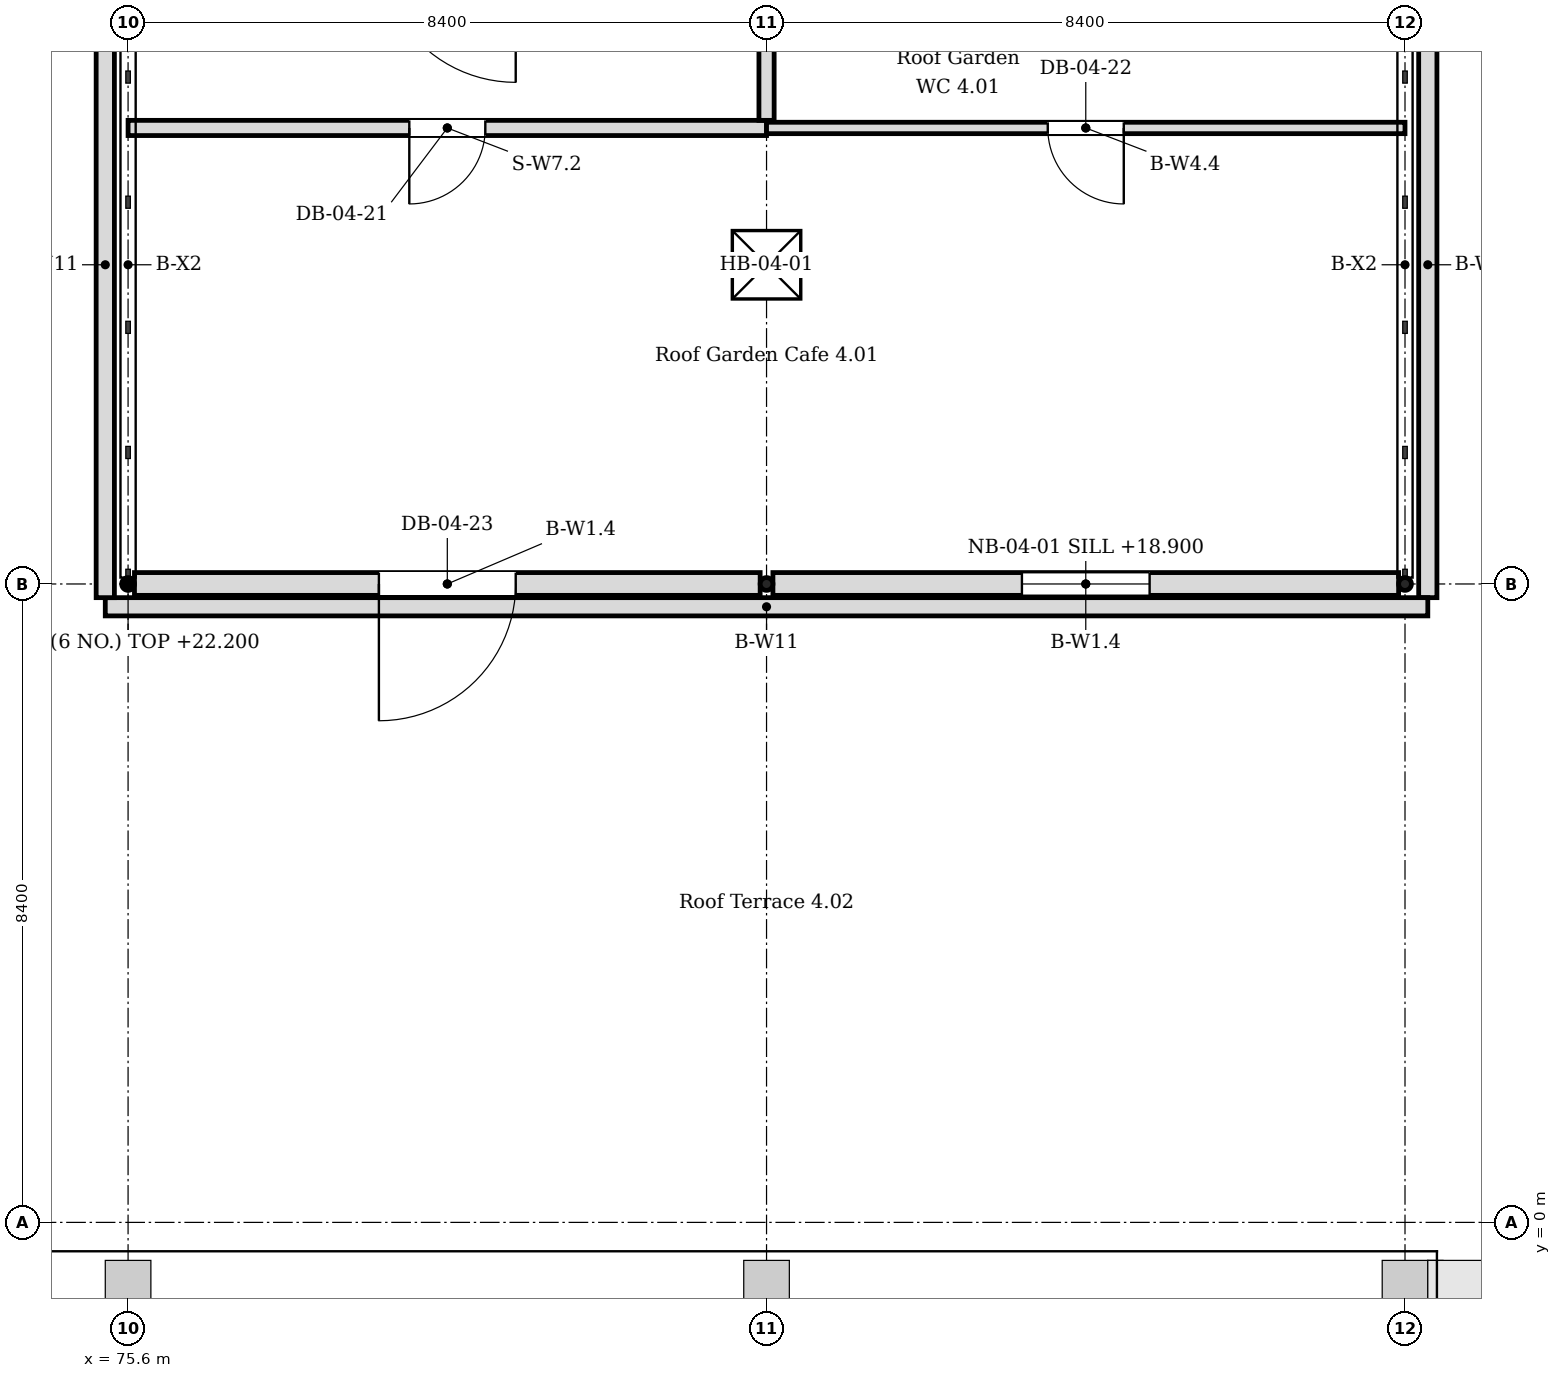
"""IFC4 building model, lengths in metres.
Left out: names, types, materials, properties, quantities, classifications, styles, units other than length and angle.
Written with IfcOpenShell. Run it as: python <this file> out.ifc"""

import sys

from ifc_helpers import new_model, si_unit, direction, frame, frame_2d, origin, origin_2d, place, context, subcontext, project, spatial, rectangle, hollow_circle, extrude, element, fill, save


model = new_model("IFC4")
c1 = context("Model", 3, precision=1e-05, world=origin(), true_north=direction((0.0, 1.0)))
c2 = subcontext(c1, "Body", "Model", "MODEL_VIEW")
j1 = project(units=[si_unit("LENGTHUNIT", "METRE"), si_unit("PLANEANGLEUNIT", "RADIAN")], contexts=[c1])
p1 = place(None, origin())
s1 = spatial("IfcSite", under=j1, at=p1, CompositionType="ELEMENT")
p2 = place(p1, origin())
s2 = spatial("IfcBuilding", under=s1, at=p2, CompositionType="ELEMENT")
p3 = place(p2, frame((0.0, 0.0, 18.6)))
s3 = spatial("IfcBuildingStorey", under=s2, at=p3, CompositionType="ELEMENT", Elevation=18.6)
for number, where, z_axis, x_axis in (
    (1, (75.6, 8.4, 0.0), (0.0, 0.0, 1.0), (1.0, 0.0, 0.0)),
    (2, (84.0, 8.4, 0.0), (0.0, 0.0, 1.0), (1.0, 0.0, 0.0)),
    (3, (92.4, 8.4, 0.0), (0.0, 0.0, 1.0), (1.0, 0.0, 0.0)),
):
    element("IfcColumn", number, at=place(p3, frame(where, z_axis=z_axis, x_axis=x_axis)), inside=s3, PredefinedType="COLUMN", context=c2, shape_type="SweptSolid", body=[
        extrude(hollow_circle(Radius=0.084, WallThickness=0.008, at=origin_2d()), origin(), (0.0, 0.0, 1.0), 3.6),
    ])
p4 = place(p3, frame((75.6, 14.4, 0.0), z_axis=(0.0, 0.0, 1.0), x_axis=(1.0, 0.0, 0.0)))
e4 = element("IfcWall", 4, at=p4, inside=s3, PredefinedType="PARTITIONING", context=c2, shape_type="SweptSolid", body=[
    extrude(rectangle(XDim=8.4, YDim=0.2, at=frame_2d((4.2, 0.0))), origin(), (0.0, 0.0, 1.0), 3.254),
])
p5 = place(p4, frame((3.7, 0.0, 0.0)))
e5 = element("IfcOpeningElement", 5, at=p5, cuts=e4, PredefinedType="OPENING", context=c2, shape_type="SweptSolid", body=[
    extrude(rectangle(XDim=1.0, YDim=2.1, at=frame_2d((0.5, 1.05))), frame((0.0, 0.11, 0.0), z_axis=(0.0, -1.0, 0.0), x_axis=(1.0, 0.0, 0.0)), (0.0, 0.0, 1.0), 0.22),
])
p6 = place(p3, frame((84.0, 14.4, 0.0), z_axis=(0.0, 0.0, 1.0), x_axis=(1.0, 0.0, 0.0)))
e6 = element("IfcWall", 6, at=p6, inside=s3, PredefinedType="PARTITIONING", context=c2, shape_type="SweptSolid", body=[
    extrude(rectangle(XDim=8.4, YDim=0.15, at=frame_2d((4.2, 0.0))), origin(), (0.0, 0.0, 1.0), 3.254),
])
p7 = place(p6, frame((3.7, 0.0, 0.0)))
e7 = element("IfcOpeningElement", 7, at=p7, cuts=e6, PredefinedType="OPENING", context=c2, shape_type="SweptSolid", body=[
    extrude(rectangle(XDim=1.0, YDim=2.1, at=frame_2d((0.5, 1.05))), frame((0.0, 0.085, 0.0), z_axis=(0.0, -1.0, 0.0), x_axis=(1.0, 0.0, 0.0)), (0.0, 0.0, 1.0), 0.17),
])
p8 = place(p3, frame((84.0, 14.5, 0.0), z_axis=(0.0, 0.0, 1.0), x_axis=(0.0, 1.0, 0.0)))
e8 = element("IfcWall", 8, at=p8, inside=s3, PredefinedType="PARTITIONING", context=c2, shape_type="SweptSolid", body=[
    extrude(rectangle(XDim=2.216, YDim=0.2, at=frame_2d((1.108, 0.0))), origin(), (0.0, 0.0, 1.0), 3.254),
])
p9 = place(p3, frame((75.684, 8.4, 0.0), z_axis=(0.0, 0.0, 1.0), x_axis=(1.0, 0.0, 0.0)))
e9 = element("IfcWall", 9, at=p9, inside=s3, PredefinedType="SOLIDWALL", context=c2, shape_type="SweptSolid", body=[
    extrude(rectangle(XDim=8.232, YDim=0.3, at=frame_2d((4.116, 0.0))), origin(), (0.0, 0.0, 1.0), 3.254),
])
p10 = place(p9, frame((3.216, 0.0, 0.0)))
e10 = element("IfcOpeningElement", 10, at=p10, cuts=e9, PredefinedType="OPENING", context=c2, shape_type="SweptSolid", body=[
    extrude(rectangle(XDim=1.8, YDim=2.2, at=frame_2d((0.9, 1.1))), frame((0.0, 0.16, 0.0), z_axis=(0.0, -1.0, 0.0), x_axis=(1.0, 0.0, 0.0)), (0.0, 0.0, 1.0), 0.32),
])
p11 = place(p3, frame((84.084, 8.4, 0.0), z_axis=(0.0, 0.0, 1.0), x_axis=(1.0, 0.0, 0.0)))
e11 = element("IfcWall", 11, at=p11, inside=s3, PredefinedType="SOLIDWALL", context=c2, shape_type="SweptSolid", body=[
    extrude(rectangle(XDim=8.232, YDim=0.3, at=frame_2d((4.116, 0.0))), origin(), (0.0, 0.0, 1.0), 3.254),
])
p12 = place(p11, frame((3.276, 0.0, 0.3)))
e12 = element("IfcOpeningElement", 12, at=p12, cuts=e11, PredefinedType="OPENING", context=c2, shape_type="SweptSolid", body=[
    extrude(rectangle(XDim=1.68, YDim=2.8, at=frame_2d((0.84, 1.4))), frame((0.0, 0.16, 0.0), z_axis=(0.0, -1.0, 0.0), x_axis=(1.0, 0.0, 0.0)), (0.0, 0.0, 1.0), 0.32),
])
p13 = place(p3, frame((75.3, 8.1, 3.8), z_axis=(0.0, 0.0, 1.0), x_axis=(1.0, 0.0, 0.0)))
e13 = element("IfcWall", 13, at=p13, inside=s3, PredefinedType="SOLIDWALL", context=c2, shape_type="SweptSolid", body=[
    extrude(rectangle(XDim=17.4, YDim=0.24, at=frame_2d((8.7, 0.0))), origin(), (0.0, 0.0, 1.0), 0.5),
])
for number, where, z_axis, x_axis in (
    (14, (75.3, 8.22, 3.8), (0.0, 0.0, 1.0), (0.0, 1.0, 0.0)),
    (15, (92.7, 8.22, 3.8), (0.0, 0.0, 1.0), (0.0, 1.0, 0.0)),
):
    element("IfcWall", number, at=place(p3, frame(where, z_axis=z_axis, x_axis=x_axis)), inside=s3, PredefinedType="SOLIDWALL", context=c2, shape_type="SweptSolid", body=[
        extrude(rectangle(XDim=8.76, YDim=0.24, at=frame_2d((4.38, 0.0))), origin(), (0.0, 0.0, 1.0), 0.5),
    ])
p14 = place(p5, origin())
e16 = element("IfcDoor", 16, at=p14, inside=s3, OperationType="SINGLE_SWING_LEFT", PredefinedType="DOOR", context=c2, shape_type="SweptSolid", body=[
    extrude(rectangle(XDim=1.0, YDim=2.1, at=frame_2d((0.5, 1.05))), frame((0.0, 0.025, 0.0), z_axis=(0.0, -1.0, 0.0), x_axis=(1.0, 0.0, 0.0)), (0.0, 0.0, 1.0), 0.05),
])
fill(e5, e16)
p15 = place(p7, origin())
e17 = element("IfcDoor", 17, at=p15, inside=s3, OperationType="SINGLE_SWING_LEFT", PredefinedType="DOOR", context=c2, shape_type="SweptSolid", body=[
    extrude(rectangle(XDim=1.0, YDim=2.1, at=frame_2d((0.5, 1.05))), frame((0.0, 0.025, 0.0), z_axis=(0.0, -1.0, 0.0), x_axis=(1.0, 0.0, 0.0)), (0.0, 0.0, 1.0), 0.05),
])
fill(e7, e17)
p16 = place(p10, origin())
e18 = element("IfcDoor", 18, at=p16, inside=s3, OperationType="DOUBLE_DOOR_SINGLE_SWING", PredefinedType="DOOR", context=c2, shape_type="SweptSolid", body=[
    extrude(rectangle(XDim=1.8, YDim=2.2, at=frame_2d((0.9, 1.1))), frame((0.0, 0.025, 0.0), z_axis=(0.0, -1.0, 0.0), x_axis=(1.0, 0.0, 0.0)), (0.0, 0.0, 1.0), 0.05),
])
fill(e10, e18)
p17 = place(p12, origin())
e19 = element("IfcWindow", 19, at=p17, inside=s3, PartitioningType="DOUBLE_PANEL_VERTICAL", PredefinedType="WINDOW", context=c2, shape_type="SweptSolid", body=[
    extrude(rectangle(XDim=1.68, YDim=2.8, at=frame_2d((0.84, 1.4))), frame((0.0, 0.03, 0.0), z_axis=(0.0, -1.0, 0.0), x_axis=(1.0, 0.0, 0.0)), (0.0, 0.0, 1.0), 0.06),
])
fill(e12, e19)
p18 = place(p3, frame((0.0, 0.0, 3.6)))
p19 = place(p18, frame((84.0, 12.6, 0.0)))
p20 = place(p19, frame((0.0, 0.0, 0.15)))
e20 = element("IfcDoor", 20, at=p20, inside=s3, OperationType="SINGLE_SWING_LEFT", PredefinedType="TRAPDOOR", context=c2, shape_type="SweptSolid", body=[
    extrude(rectangle(XDim=0.9, YDim=0.9, at=origin_2d()), origin(), (0.0, 0.0, 1.0), 0.05),
])
save(model, sys.argv[1])
